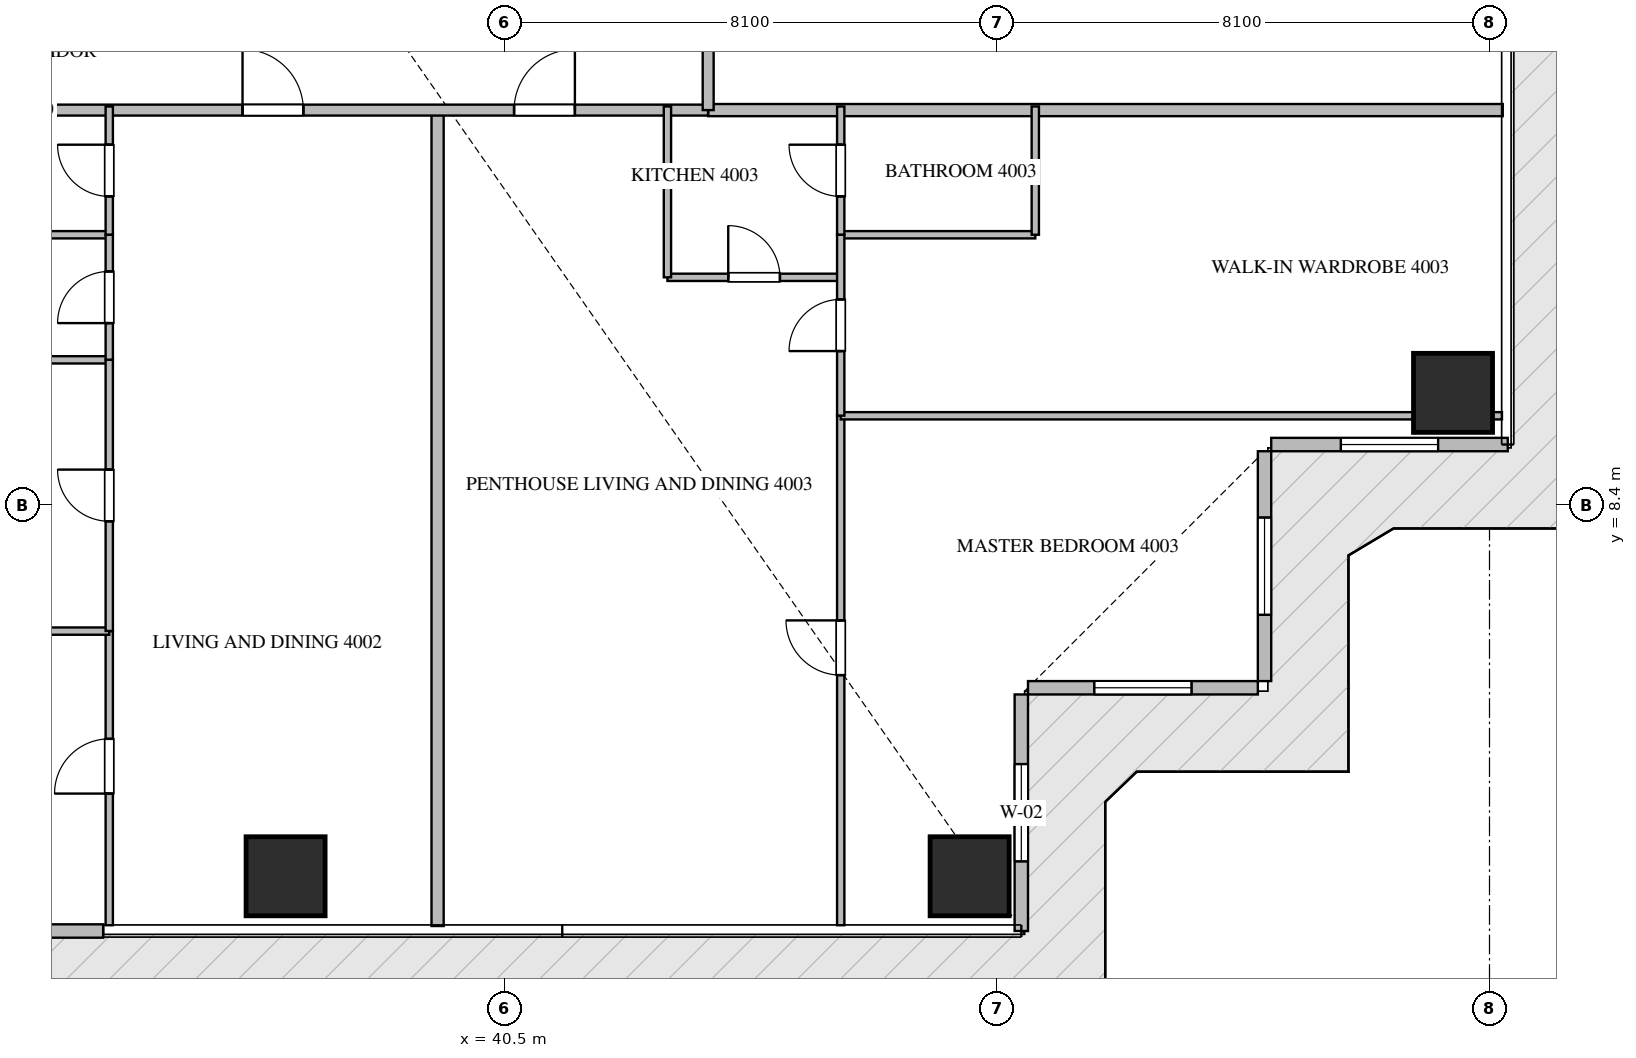
"""IFC4 building model, lengths in metres.
Left out: names, types, materials, properties, quantities, classifications, styles, units other than length and angle.
Written with IfcOpenShell. Run it as: python <this file> out.ifc"""

import sys

from ifc_helpers import new_model, si_unit, direction, frame, frame_2d, origin, origin_2d, place, context, subcontext, project, spatial, rectangle, extrude, source, transform, mapped, element, fill, save


model = new_model("IFC4")
c1 = context("Model", 3, precision=1e-05, world=origin(), true_north=direction((0.0, 1.0)))
c2 = subcontext(c1, "Body", "Model", "MODEL_VIEW")
j1 = project(units=[si_unit("LENGTHUNIT", "METRE"), si_unit("PLANEANGLEUNIT", "RADIAN")], contexts=[c1])
p1 = place(None, origin())
s1 = spatial("IfcSite", under=j1, at=p1, CompositionType="ELEMENT")
p2 = place(p1, origin())
s2 = spatial("IfcBuilding", under=s1, at=p2, CompositionType="ELEMENT")
p3 = place(p2, frame((0.0, 0.0, 161.4)))
s3 = spatial("IfcBuildingStorey", under=s2, at=p3, CompositionType="ELEMENT", Elevation=161.4)
m1 = source(origin(), c2, "Body", "SweptSolid", [
    extrude(rectangle(XDim=1.3, YDim=1.3, at=origin_2d()), origin(), (0.0, 0.0, 1.0), 3.75),
])
for number, where, z_axis, x_axis in (
    (1, (36.9, 2.3, -0.26), (0.0, 0.0, 1.0), (1.0, 0.0, 0.0)),
    (2, (48.15, 2.3, -0.26), (0.0, 0.0, 1.0), (1.0, 0.0, 0.0)),
    (3, (56.1, 10.25, -0.26), (0.0, 0.0, 1.0), (1.0, 0.0, 0.0)),
):
    element("IfcColumn", number, at=place(p3, frame(where, z_axis=z_axis, x_axis=x_axis)), inside=s3, PredefinedType="COLUMN", context=c2, shape_type="MappedRepresentation", body=[
        mapped(m1, transform((0.0, 0.0, 0.0), scale=1.0)),
    ])
p4 = place(p3, frame((30.9, 1.4, 0.0), z_axis=(0.0, 0.0, 1.0), x_axis=(1.0, 0.0, 0.0)))
e4 = element("IfcWall", 4, at=p4, inside=s3, PredefinedType="ELEMENTEDWALL", context=c2, shape_type="SweptSolid", body=[
    extrude(rectangle(XDim=3.0, YDim=0.22, at=frame_2d((1.5, 0.0))), origin(), (0.0, 0.0, 1.0), 3.475),
])
p5 = place(p4, frame((0.95, 0.0, 0.0)))
e5 = element("IfcOpeningElement", 5, at=p5, cuts=e4, PredefinedType="OPENING", context=c2, shape_type="SweptSolid", body=[
    extrude(rectangle(XDim=1.1, YDim=2.2, at=frame_2d((0.55, 1.1))), frame((0.0, 0.12, 0.0), z_axis=(0.0, -1.0, 0.0), x_axis=(1.0, 0.0, 0.0)), (0.0, 0.0, 1.0), 0.24),
])
p6 = place(p3, frame((49.0, 1.4, 0.0), z_axis=(0.0, 0.0, 1.0), x_axis=(0.0, 1.0, 0.0)))
e6 = element("IfcWall", 6, at=p6, inside=s3, PredefinedType="ELEMENTEDWALL", context=c2, shape_type="SweptSolid", body=[
    extrude(rectangle(XDim=3.89, YDim=0.22, at=frame_2d((1.945, 0.0))), origin(), (0.0, 0.0, 1.0), 3.475),
])
p7 = place(p6, frame((1.145, 0.0, 0.65)))
e7 = element("IfcOpeningElement", 7, at=p7, cuts=e6, PredefinedType="OPENING", context=c2, shape_type="SweptSolid", body=[
    extrude(rectangle(XDim=1.6, YDim=2.1, at=frame_2d((0.8, 1.05))), frame((0.0, 0.12, 0.0), z_axis=(0.0, -1.0, 0.0), x_axis=(1.0, 0.0, 0.0)), (0.0, 0.0, 1.0), 0.24),
])
p8 = place(p3, frame((49.11, 5.4, 0.0), z_axis=(0.0, 0.0, 1.0), x_axis=(1.0, 0.0, 0.0)))
e8 = element("IfcWall", 8, at=p8, inside=s3, PredefinedType="ELEMENTEDWALL", context=c2, shape_type="SweptSolid", body=[
    extrude(rectangle(XDim=3.78, YDim=0.22, at=frame_2d((1.89, 0.0))), origin(), (0.0, 0.0, 1.0), 3.475),
])
p9 = place(p8, frame((1.09, 0.0, 0.65)))
e9 = element("IfcOpeningElement", 9, at=p9, cuts=e8, PredefinedType="OPENING", context=c2, shape_type="SweptSolid", body=[
    extrude(rectangle(XDim=1.6, YDim=2.1, at=frame_2d((0.8, 1.05))), frame((0.0, 0.12, 0.0), z_axis=(0.0, -1.0, 0.0), x_axis=(1.0, 0.0, 0.0)), (0.0, 0.0, 1.0), 0.24),
])
p10 = place(p3, frame((53.0, 5.51, 0.0), z_axis=(0.0, 0.0, 1.0), x_axis=(0.0, 1.0, 0.0)))
e10 = element("IfcWall", 10, at=p10, inside=s3, PredefinedType="ELEMENTEDWALL", context=c2, shape_type="SweptSolid", body=[
    extrude(rectangle(XDim=3.78, YDim=0.22, at=frame_2d((1.89, 0.0))), origin(), (0.0, 0.0, 1.0), 3.475),
])
p11 = place(p10, frame((1.09, 0.0, 0.65)))
e11 = element("IfcOpeningElement", 11, at=p11, cuts=e10, PredefinedType="OPENING", context=c2, shape_type="SweptSolid", body=[
    extrude(rectangle(XDim=1.6, YDim=2.1, at=frame_2d((0.8, 1.05))), frame((0.0, 0.12, 0.0), z_axis=(0.0, -1.0, 0.0), x_axis=(1.0, 0.0, 0.0)), (0.0, 0.0, 1.0), 0.24),
])
p12 = place(p3, frame((53.11, 9.4, 0.0), z_axis=(0.0, 0.0, 1.0), x_axis=(1.0, 0.0, 0.0)))
e12 = element("IfcWall", 12, at=p12, inside=s3, PredefinedType="ELEMENTEDWALL", context=c2, shape_type="SweptSolid", body=[
    extrude(rectangle(XDim=3.89, YDim=0.22, at=frame_2d((1.945, 0.0))), origin(), (0.0, 0.0, 1.0), 3.475),
])
p13 = place(p12, frame((1.145, 0.0, 0.65)))
e13 = element("IfcOpeningElement", 13, at=p13, cuts=e12, PredefinedType="OPENING", context=c2, shape_type="SweptSolid", body=[
    extrude(rectangle(XDim=1.6, YDim=2.1, at=frame_2d((0.8, 1.05))), frame((0.0, 0.12, 0.0), z_axis=(0.0, -1.0, 0.0), x_axis=(1.0, 0.0, 0.0)), (0.0, 0.0, 1.0), 0.24),
])
p14 = place(p3, frame((39.4, 1.482, 0.0), z_axis=(0.0, 0.0, 1.0), x_axis=(0.0, 1.0, 0.0)))
e14 = element("IfcWall", 14, at=p14, inside=s3, PredefinedType="PARTITIONING", context=c2, shape_type="SweptSolid", body=[
    extrude(rectangle(XDim=13.418, YDim=0.2, at=frame_2d((6.709, 0.0))), origin(), (0.0, 0.0, 1.0), 3.49),
])
p15 = place(p3, frame((43.85, 14.9, 0.0), z_axis=(0.0, 0.0, 1.0), x_axis=(1.0, 0.0, 0.0)))
e15 = element("IfcWall", 15, at=p15, inside=s3, PredefinedType="PARTITIONING", context=c2, shape_type="SweptSolid", body=[
    extrude(rectangle(XDim=13.068, YDim=0.2, at=frame_2d((6.534, 0.0))), origin(), (0.0, 0.0, 1.0), 3.49),
])
p16 = place(p3, frame((20.952, 14.9, 0.0), z_axis=(0.0, 0.0, 1.0), x_axis=(1.0, 0.0, 0.0)))
e16 = element("IfcWall", 16, at=p16, inside=s3, PredefinedType="PARTITIONING", context=c2, shape_type="SweptSolid", body=[
    extrude(rectangle(XDim=22.896, YDim=0.18, at=frame_2d((11.448, 0.0))), origin(), (0.0, 0.0, 1.0), 3.49),
])
p17 = place(p16, frame((2.19, 0.0, 0.0)))
e17 = element("IfcOpeningElement", 17, at=p17, cuts=e16, PredefinedType="OPENING", context=c2, shape_type="SweptSolid", body=[
    extrude(rectangle(XDim=1.0, YDim=2.15, at=frame_2d((0.5, 1.075))), frame((0.0, 0.1, 0.0), z_axis=(0.0, -1.0, 0.0), x_axis=(1.0, 0.0, 0.0)), (0.0, 0.0, 1.0), 0.2),
])
p18 = place(p16, frame((15.24, 0.0, 0.0)))
e18 = element("IfcOpeningElement", 18, at=p18, cuts=e16, PredefinedType="OPENING", context=c2, shape_type="SweptSolid", body=[
    extrude(rectangle(XDim=1.0, YDim=2.15, at=frame_2d((0.5, 1.075))), frame((0.0, 0.1, 0.0), z_axis=(0.0, -1.0, 0.0), x_axis=(1.0, 0.0, 0.0)), (0.0, 0.0, 1.0), 0.2),
])
p19 = place(p16, frame((19.706, 0.0, 0.0)))
e19 = element("IfcOpeningElement", 19, at=p19, cuts=e16, PredefinedType="OPENING", context=c2, shape_type="SweptSolid", body=[
    extrude(rectangle(XDim=1.0, YDim=2.15, at=frame_2d((0.5, 1.075))), frame((0.0, 0.1, 0.0), z_axis=(0.0, -1.0, 0.0), x_axis=(1.0, 0.0, 0.0)), (0.0, 0.0, 1.0), 0.2),
])
p20 = place(p3, frame((43.85, 14.9, 0.0), z_axis=(0.0, 0.0, 1.0), x_axis=(0.0, 1.0, 0.0)))
e20 = element("IfcWall", 20, at=p20, inside=s3, PredefinedType="PARTITIONING", context=c2, shape_type="SweptSolid", body=[
    extrude(rectangle(XDim=18.7, YDim=0.18, at=frame_2d((9.35, 0.0))), origin(), (0.0, 0.0, 1.0), 3.49),
])
p21 = place(p20, frame((1.805, 0.0, 0.0)))
e21 = element("IfcOpeningElement", 21, at=p21, cuts=e20, PredefinedType="OPENING", context=c2, shape_type="SweptSolid", body=[
    extrude(rectangle(XDim=1.0, YDim=2.15, at=frame_2d((0.5, 1.075))), frame((0.0, 0.1, 0.0), z_axis=(0.0, -1.0, 0.0), x_axis=(1.0, 0.0, 0.0)), (0.0, 0.0, 1.0), 0.2),
])
p22 = place(p3, frame((34.0, 1.495, 0.0), z_axis=(0.0, 0.0, 1.0), x_axis=(0.0, 1.0, 0.0)))
e22 = element("IfcWall", 22, at=p22, inside=s3, PredefinedType="PARTITIONING", context=c2, shape_type="SweptSolid", body=[
    extrude(rectangle(XDim=4.837, YDim=0.12, at=frame_2d((2.418, 0.0))), origin(), (0.0, 0.0, 1.0), 3.49),
])
p23 = place(p22, frame((2.165, 0.0, 0.0)))
e23 = element("IfcOpeningElement", 23, at=p23, cuts=e22, PredefinedType="OPENING", context=c2, shape_type="SweptSolid", body=[
    extrude(rectangle(XDim=0.9, YDim=2.1, at=frame_2d((0.45, 1.05))), frame((0.0, 0.07, 0.0), z_axis=(0.0, -1.0, 0.0), x_axis=(1.0, 0.0, 0.0)), (0.0, 0.0, 1.0), 0.14),
])
for number, where, z_axis, x_axis in (
    (24, (25.14, 6.332, 0.0), (0.0, 0.0, 1.0), (1.0, 0.0, 0.0)),
    (25, (25.14, 10.793, 0.0), (0.0, 0.0, 1.0), (1.0, 0.0, 0.0)),
    (26, (25.14, 12.85, 0.0), (0.0, 0.0, 1.0), (1.0, 0.0, 0.0)),
):
    element("IfcWall", number, at=place(p3, frame(where, z_axis=z_axis, x_axis=x_axis)), inside=s3, PredefinedType="PARTITIONING", context=c2, shape_type="SweptSolid", body=[
        extrude(rectangle(XDim=8.86, YDim=0.12, at=frame_2d((4.43, 0.0))), origin(), (0.0, 0.0, 1.0), 3.49),
    ])
p24 = place(p3, frame((34.0, 6.334, 0.0), z_axis=(0.0, 0.0, 1.0), x_axis=(0.0, 1.0, 0.0)))
e27 = element("IfcWall", 27, at=p24, inside=s3, PredefinedType="PARTITIONING", context=c2, shape_type="SweptSolid", body=[
    extrude(rectangle(XDim=4.459, YDim=0.12, at=frame_2d((2.229, 0.0))), origin(), (0.0, 0.0, 1.0), 3.49),
])
p25 = place(p24, frame((1.804, 0.0, 0.0)))
e28 = element("IfcOpeningElement", 28, at=p25, cuts=e27, PredefinedType="OPENING", context=c2, shape_type="SweptSolid", body=[
    extrude(rectangle(XDim=0.85, YDim=2.1, at=frame_2d((0.425, 1.05))), frame((0.0, 0.07, 0.0), z_axis=(0.0, -1.0, 0.0), x_axis=(1.0, 0.0, 0.0)), (0.0, 0.0, 1.0), 0.14),
])
p26 = place(p3, frame((34.0, 10.795, 0.0), z_axis=(0.0, 0.0, 1.0), x_axis=(0.0, 1.0, 0.0)))
e29 = element("IfcWall", 29, at=p26, inside=s3, PredefinedType="PARTITIONING", context=c2, shape_type="SweptSolid", body=[
    extrude(rectangle(XDim=2.055, YDim=0.12, at=frame_2d((1.028, 0.0))), origin(), (0.0, 0.0, 1.0), 3.49),
])
p27 = place(p26, frame((0.602, 0.0, 0.0)))
e30 = element("IfcOpeningElement", 30, at=p27, cuts=e29, PredefinedType="OPENING", context=c2, shape_type="SweptSolid", body=[
    extrude(rectangle(XDim=0.85, YDim=2.1, at=frame_2d((0.425, 1.05))), frame((0.0, 0.07, 0.0), z_axis=(0.0, -1.0, 0.0), x_axis=(1.0, 0.0, 0.0)), (0.0, 0.0, 1.0), 0.14),
])
p28 = place(p3, frame((34.0, 12.852, 0.0), z_axis=(0.0, 0.0, 1.0), x_axis=(0.0, 1.0, 0.0)))
e31 = element("IfcWall", 31, at=p28, inside=s3, PredefinedType="PARTITIONING", context=c2, shape_type="SweptSolid", body=[
    extrude(rectangle(XDim=2.108, YDim=0.12, at=frame_2d((1.054, 0.0))), origin(), (0.0, 0.0, 1.0), 3.49),
])
p29 = place(p28, frame((0.629, 0.0, 0.0)))
e32 = element("IfcOpeningElement", 32, at=p29, cuts=e31, PredefinedType="OPENING", context=c2, shape_type="SweptSolid", body=[
    extrude(rectangle(XDim=0.85, YDim=2.1, at=frame_2d((0.425, 1.05))), frame((0.0, 0.07, 0.0), z_axis=(0.0, -1.0, 0.0), x_axis=(1.0, 0.0, 0.0)), (0.0, 0.0, 1.0), 0.14),
])
p30 = place(p3, frame((43.18, 12.15, 0.0), z_axis=(0.0, 0.0, 1.0), x_axis=(1.0, 0.0, 0.0)))
e33 = element("IfcWall", 33, at=p30, inside=s3, PredefinedType="PARTITIONING", context=c2, shape_type="SweptSolid", body=[
    extrude(rectangle(XDim=2.85, YDim=0.12, at=frame_2d((1.425, 0.0))), origin(), (0.0, 0.0, 1.0), 3.49),
])
p31 = place(p30, frame((1.0, 0.0, 0.0)))
e34 = element("IfcOpeningElement", 34, at=p31, cuts=e33, PredefinedType="OPENING", context=c2, shape_type="SweptSolid", body=[
    extrude(rectangle(XDim=0.85, YDim=2.1, at=frame_2d((0.425, 1.05))), frame((0.0, 0.07, 0.0), z_axis=(0.0, -1.0, 0.0), x_axis=(1.0, 0.0, 0.0)), (0.0, 0.0, 1.0), 0.14),
])
p32 = place(p3, frame((43.18, 12.15, 0.0), z_axis=(0.0, 0.0, 1.0), x_axis=(0.0, 1.0, 0.0)))
e35 = element("IfcWall", 35, at=p32, inside=s3, PredefinedType="PARTITIONING", context=c2, shape_type="SweptSolid", body=[
    extrude(rectangle(XDim=2.81, YDim=0.12, at=frame_2d((1.405, 0.0))), origin(), (0.0, 0.0, 1.0), 3.49),
])
p33 = place(p3, frame((46.03, 1.495, 0.0), z_axis=(0.0, 0.0, 1.0), x_axis=(0.0, 1.0, 0.0)))
e36 = element("IfcWall", 36, at=p33, inside=s3, PredefinedType="PARTITIONING", context=c2, shape_type="SweptSolid", body=[
    extrude(rectangle(XDim=8.378, YDim=0.12, at=frame_2d((4.189, 0.0))), origin(), (0.0, 0.0, 1.0), 3.49),
])
p34 = place(p33, frame((4.113, 0.0, 0.0)))
e37 = element("IfcOpeningElement", 37, at=p34, cuts=e36, PredefinedType="OPENING", context=c2, shape_type="SweptSolid", body=[
    extrude(rectangle(XDim=0.9, YDim=2.1, at=frame_2d((0.45, 1.05))), frame((0.0, 0.07, 0.0), z_axis=(0.0, -1.0, 0.0), x_axis=(1.0, 0.0, 0.0)), (0.0, 0.0, 1.0), 0.14),
])
p35 = place(p3, frame((46.03, 9.873, 0.0), z_axis=(0.0, 0.0, 1.0), x_axis=(1.0, 0.0, 0.0)))
e38 = element("IfcWall", 38, at=p35, inside=s3, PredefinedType="PARTITIONING", context=c2, shape_type="SweptSolid", body=[
    extrude(rectangle(XDim=10.875, YDim=0.12, at=frame_2d((5.438, 0.0))), origin(), (0.0, 0.0, 1.0), 3.49),
])
p36 = place(p3, frame((46.03, 12.85, 0.0), z_axis=(0.0, 0.0, 1.0), x_axis=(1.0, 0.0, 0.0)))
e39 = element("IfcWall", 39, at=p36, inside=s3, PredefinedType="PARTITIONING", context=c2, shape_type="SweptSolid", body=[
    extrude(rectangle(XDim=3.2, YDim=0.12, at=frame_2d((1.6, 0.0))), origin(), (0.0, 0.0, 1.0), 3.49),
])
p37 = place(p3, frame((49.23, 12.85, 0.0), z_axis=(0.0, 0.0, 1.0), x_axis=(0.0, 1.0, 0.0)))
e40 = element("IfcWall", 40, at=p37, inside=s3, PredefinedType="PARTITIONING", context=c2, shape_type="SweptSolid", body=[
    extrude(rectangle(XDim=2.11, YDim=0.12, at=frame_2d((1.055, 0.0))), origin(), (0.0, 0.0, 1.0), 3.49),
])
p38 = place(p3, frame((46.03, 9.875, 0.0), z_axis=(0.0, 0.0, 1.0), x_axis=(0.0, 1.0, 0.0)))
e41 = element("IfcWall", 41, at=p38, inside=s3, PredefinedType="PARTITIONING", context=c2, shape_type="SweptSolid", body=[
    extrude(rectangle(XDim=2.975, YDim=0.12, at=frame_2d((1.488, 0.0))), origin(), (0.0, 0.0, 1.0), 3.49),
])
p39 = place(p38, frame((1.062, 0.0, 0.0)))
e42 = element("IfcOpeningElement", 42, at=p39, cuts=e41, PredefinedType="OPENING", context=c2, shape_type="SweptSolid", body=[
    extrude(rectangle(XDim=0.85, YDim=2.1, at=frame_2d((0.425, 1.05))), frame((0.0, 0.07, 0.0), z_axis=(0.0, -1.0, 0.0), x_axis=(1.0, 0.0, 0.0)), (0.0, 0.0, 1.0), 0.14),
])
p40 = place(p3, frame((46.03, 12.852, 0.0), z_axis=(0.0, 0.0, 1.0), x_axis=(0.0, 1.0, 0.0)))
e43 = element("IfcWall", 43, at=p40, inside=s3, PredefinedType="PARTITIONING", context=c2, shape_type="SweptSolid", body=[
    extrude(rectangle(XDim=2.108, YDim=0.12, at=frame_2d((1.054, 0.0))), origin(), (0.0, 0.0, 1.0), 3.49),
])
p41 = place(p40, frame((0.629, 0.0, 0.0)))
e44 = element("IfcOpeningElement", 44, at=p41, cuts=e43, PredefinedType="OPENING", context=c2, shape_type="SweptSolid", body=[
    extrude(rectangle(XDim=0.85, YDim=2.1, at=frame_2d((0.425, 1.05))), frame((0.0, 0.07, 0.0), z_axis=(0.0, -1.0, 0.0), x_axis=(1.0, 0.0, 0.0)), (0.0, 0.0, 1.0), 0.14),
])
m2 = source(origin(), c2, "Body", "SweptSolid", [
    extrude(rectangle(XDim=1.6, YDim=2.1, at=frame_2d((0.8, 1.05))), frame((0.0, 0.03, 0.0), z_axis=(0.0, -1.0, 0.0), x_axis=(1.0, 0.0, 0.0)), (0.0, 0.0, 1.0), 0.06),
])
p42 = place(p7, origin())
e45 = element("IfcWindow", 45, at=p42, inside=s3, PartitioningType="SINGLE_PANEL", PredefinedType="WINDOW", context=c2, shape_type="MappedRepresentation", body=[
    mapped(m2, transform((0.0, 0.0, 0.0), scale=1.0)),
])
fill(e7, e45)
p43 = place(p9, origin())
e46 = element("IfcWindow", 46, at=p43, inside=s3, PartitioningType="SINGLE_PANEL", PredefinedType="WINDOW", context=c2, shape_type="MappedRepresentation", body=[
    mapped(m2, transform((0.0, 0.0, 0.0), scale=1.0)),
])
fill(e9, e46)
p44 = place(p11, origin())
e47 = element("IfcWindow", 47, at=p44, inside=s3, PartitioningType="SINGLE_PANEL", PredefinedType="WINDOW", context=c2, shape_type="MappedRepresentation", body=[
    mapped(m2, transform((0.0, 0.0, 0.0), scale=1.0)),
])
fill(e11, e47)
p45 = place(p13, origin())
e48 = element("IfcWindow", 48, at=p45, inside=s3, PartitioningType="SINGLE_PANEL", PredefinedType="WINDOW", context=c2, shape_type="MappedRepresentation", body=[
    mapped(m2, transform((0.0, 0.0, 0.0), scale=1.0)),
])
fill(e13, e48)
m3 = source(origin(), c2, "Body", "SweptSolid", [
    extrude(rectangle(XDim=1.0, YDim=2.15, at=frame_2d((0.5, 1.075))), frame((0.0, 0.025, 0.0), z_axis=(0.0, -1.0, 0.0), x_axis=(1.0, 0.0, 0.0)), (0.0, 0.0, 1.0), 0.05),
])
p46 = place(p18, origin())
e49 = element("IfcDoor", 49, at=p46, inside=s3, OperationType="SINGLE_SWING_LEFT", PredefinedType="DOOR", context=c2, shape_type="MappedRepresentation", body=[
    mapped(m3, transform((0.0, 0.0, 0.0), scale=1.0)),
])
fill(e18, e49)
p47 = place(p19, origin())
e50 = element("IfcDoor", 50, at=p47, inside=s3, OperationType="SINGLE_SWING_RIGHT", PredefinedType="DOOR", context=c2, shape_type="MappedRepresentation", body=[
    mapped(m3, transform((0.0, 0.0, 0.0), scale=1.0)),
])
fill(e19, e50)
m4 = source(origin(), c2, "Body", "SweptSolid", [
    extrude(rectangle(XDim=0.9, YDim=2.1, at=frame_2d((0.45, 1.05))), frame((0.0, 0.025, 0.0), z_axis=(0.0, -1.0, 0.0), x_axis=(1.0, 0.0, 0.0)), (0.0, 0.0, 1.0), 0.05),
])
p48 = place(p23, origin())
e51 = element("IfcDoor", 51, at=p48, inside=s3, OperationType="SINGLE_SWING_LEFT", PredefinedType="DOOR", context=c2, shape_type="MappedRepresentation", body=[
    mapped(m4, transform((0.0, 0.0, 0.0), scale=1.0)),
])
fill(e23, e51)
m5 = source(origin(), c2, "Body", "SweptSolid", [
    extrude(rectangle(XDim=0.85, YDim=2.1, at=frame_2d((0.425, 1.05))), frame((0.0, 0.025, 0.0), z_axis=(0.0, -1.0, 0.0), x_axis=(1.0, 0.0, 0.0)), (0.0, 0.0, 1.0), 0.05),
])
p49 = place(p25, origin())
e52 = element("IfcDoor", 52, at=p49, inside=s3, OperationType="SINGLE_SWING_RIGHT", PredefinedType="DOOR", context=c2, shape_type="MappedRepresentation", body=[
    mapped(m5, transform((0.0, 0.0, 0.0), scale=1.0)),
])
fill(e28, e52)
p50 = place(p27, origin())
e53 = element("IfcDoor", 53, at=p50, inside=s3, OperationType="SINGLE_SWING_LEFT", PredefinedType="DOOR", context=c2, shape_type="MappedRepresentation", body=[
    mapped(m5, transform((0.0, 0.0, 0.0), scale=1.0)),
])
fill(e30, e53)
p51 = place(p29, origin())
e54 = element("IfcDoor", 54, at=p51, inside=s3, OperationType="SINGLE_SWING_RIGHT", PredefinedType="DOOR", context=c2, shape_type="MappedRepresentation", body=[
    mapped(m5, transform((0.0, 0.0, 0.0), scale=1.0)),
])
fill(e32, e54)
p52 = place(p31, origin())
e55 = element("IfcDoor", 55, at=p52, inside=s3, OperationType="SINGLE_SWING_LEFT", PredefinedType="DOOR", context=c2, shape_type="MappedRepresentation", body=[
    mapped(m5, transform((0.0, 0.0, 0.0), scale=1.0)),
])
fill(e34, e55)
p53 = place(p34, origin())
e56 = element("IfcDoor", 56, at=p53, inside=s3, OperationType="SINGLE_SWING_RIGHT", PredefinedType="DOOR", context=c2, shape_type="MappedRepresentation", body=[
    mapped(m4, transform((0.0, 0.0, 0.0), scale=1.0)),
])
fill(e37, e56)
p54 = place(p39, origin())
e57 = element("IfcDoor", 57, at=p54, inside=s3, OperationType="SINGLE_SWING_LEFT", PredefinedType="DOOR", context=c2, shape_type="MappedRepresentation", body=[
    mapped(m5, transform((0.0, 0.0, 0.0), scale=1.0)),
])
fill(e42, e57)
p55 = place(p41, origin())
e58 = element("IfcDoor", 58, at=p55, inside=s3, OperationType="SINGLE_SWING_RIGHT", PredefinedType="DOOR", context=c2, shape_type="MappedRepresentation", body=[
    mapped(m5, transform((0.0, 0.0, 0.0), scale=1.0)),
])
fill(e44, e58)
save(model, sys.argv[1])
